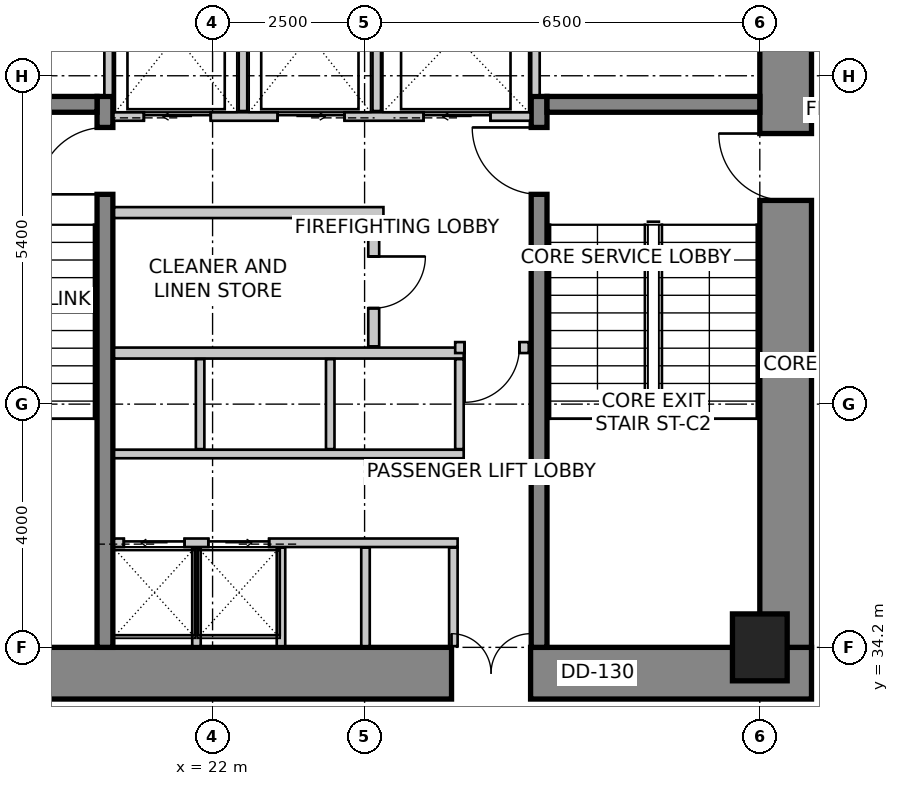
"""IFC4 building model, lengths in metres.
Left out: names, types, materials, properties, quantities, classifications, styles, units other than length and angle.
Written with IfcOpenShell. Run it as: python <this file> out.ifc"""

import sys

from ifc_helpers import new_model, si_unit, direction, frame, frame_2d, origin, origin_2d, place, context, subcontext, project, spatial, rectangle, extrude, source, transform, mapped, element, fill, save


model = new_model("IFC4")
c1 = context("Model", 3, precision=1e-05, world=origin(), true_north=direction((0.0, 1.0)))
c2 = subcontext(c1, "Body", "Model", "MODEL_VIEW")
j1 = project(units=[si_unit("LENGTHUNIT", "METRE"), si_unit("PLANEANGLEUNIT", "RADIAN")], contexts=[c1])
p1 = place(None, origin())
s1 = spatial("IfcSite", under=j1, at=p1, CompositionType="ELEMENT")
p2 = place(p1, origin())
s2 = spatial("IfcBuilding", under=s1, at=p2, CompositionType="ELEMENT")
p3 = place(p2, frame((0.0, 0.0, 67.0)))
s3 = spatial("IfcBuildingStorey", under=s2, at=p3, CompositionType="ELEMENT", Elevation=67.0)
p4 = place(p3, frame((15.75, 33.775, 0.0), z_axis=(0.0, 0.0, 1.0), x_axis=(1.0, 0.0, 0.0)))
e1 = element("IfcWall", 1, at=p4, inside=s3, PredefinedType="SHEAR", context=c2, shape_type="SweptSolid", body=[
    extrude(rectangle(XDim=16.1, YDim=0.85, at=frame_2d((8.05, 0.0))), origin(), (0.0, 0.0, 1.0), 4.0),
])
m1 = source(origin(), c2, "Body", "SweptSolid", [
    extrude(rectangle(XDim=1.3, YDim=2.15, at=frame_2d((0.65, 1.075))), frame((0.0, 0.435, 0.0), z_axis=(0.0, -1.0, 0.0), x_axis=(1.0, 0.0, 0.0)), (0.0, 0.0, 1.0), 0.87),
])
p5 = place(p4, frame((10.18, 0.0, 0.0)))
e2 = element("IfcOpeningElement", 2, at=p5, cuts=e1, PredefinedType="OPENING", context=c2, shape_type="MappedRepresentation", body=[
    mapped(m1, transform((0.0, 0.0, 0.0), scale=1.0)),
])
p6 = place(p3, frame((31.425, 34.2, 0.0), z_axis=(0.0, 0.0, 1.0), x_axis=(0.0, 1.0, 0.0)))
e3 = element("IfcWall", 3, at=p6, inside=s3, PredefinedType="SHEAR", context=c2, shape_type="SweptSolid", body=[
    extrude(rectangle(XDim=11.4, YDim=0.85, at=frame_2d((5.7, 0.0))), origin(), (0.0, 0.0, 1.0), 4.0),
])
m2 = source(origin(), c2, "Body", "SweptSolid", [
    extrude(rectangle(XDim=1.1, YDim=2.15, at=frame_2d((0.55, 1.075))), frame((0.0, 0.435, 0.0), z_axis=(0.0, -1.0, 0.0), x_axis=(1.0, 0.0, 0.0)), (0.0, 0.0, 1.0), 0.87),
])
p7 = place(p6, frame((7.35, 0.0, 0.0)))
e4 = element("IfcOpeningElement", 4, at=p7, cuts=e3, PredefinedType="OPENING", context=c2, shape_type="MappedRepresentation", body=[
    mapped(m2, transform((0.0, 0.0, 0.0), scale=1.0)),
])
p8 = place(p3, frame((20.23, 34.2, 0.0), z_axis=(0.0, 0.0, 1.0), x_axis=(0.0, 1.0, 0.0)))
e5 = element("IfcWall", 5, at=p8, inside=s3, PredefinedType="SHEAR", context=c2, shape_type="SweptSolid", body=[
    extrude(rectangle(XDim=9.06, YDim=0.26, at=frame_2d((4.53, 0.0))), origin(), (0.0, 0.0, 1.0), 4.0),
])
m3 = source(origin(), c2, "Body", "SweptSolid", [
    extrude(rectangle(XDim=1.1, YDim=2.15, at=frame_2d((0.55, 1.075))), frame((0.0, 0.14, 0.0), z_axis=(0.0, -1.0, 0.0), x_axis=(1.0, 0.0, 0.0)), (0.0, 0.0, 1.0), 0.28),
])
p9 = place(p8, frame((7.45, 0.0, 0.0)))
e6 = element("IfcOpeningElement", 6, at=p9, cuts=e5, PredefinedType="OPENING", context=c2, shape_type="MappedRepresentation", body=[
    mapped(m3, transform((0.0, 0.0, 0.0), scale=1.0)),
])
p10 = place(p3, frame((27.37, 34.2, 0.0), z_axis=(0.0, 0.0, 1.0), x_axis=(0.0, 1.0, 0.0)))
e7 = element("IfcWall", 7, at=p10, inside=s3, PredefinedType="SHEAR", context=c2, shape_type="SweptSolid", body=[
    extrude(rectangle(XDim=9.06, YDim=0.26, at=frame_2d((4.53, 0.0))), origin(), (0.0, 0.0, 1.0), 4.0),
])
p11 = place(p10, frame((7.45, 0.0, 0.0)))
e8 = element("IfcOpeningElement", 8, at=p11, cuts=e7, PredefinedType="OPENING", context=c2, shape_type="MappedRepresentation", body=[
    mapped(m3, transform((0.0, 0.0, 0.0), scale=1.0)),
])
for number, where, z_axis, x_axis in (
    (9, (16.6, 43.13, 0.0), (0.0, 0.0, 1.0), (1.0, 0.0, 0.0)),
    (10, (27.5, 43.13, 0.0), (0.0, 0.0, 1.0), (1.0, 0.0, 0.0)),
):
    element("IfcWall", number, at=place(p3, frame(where, z_axis=z_axis, x_axis=x_axis)), inside=s3, PredefinedType="SHEAR", context=c2, shape_type="SweptSolid", body=[
        extrude(rectangle(XDim=3.5, YDim=0.26, at=frame_2d((1.75, 0.0))), origin(), (0.0, 0.0, 1.0), 4.0),
    ])
m4 = source(origin(), c2, "Body", "SweptSolid", [
    extrude(rectangle(XDim=0.9, YDim=1.1, at=origin_2d()), origin(), (0.0, 0.0, 1.0), 4.0),
])
p12 = place(p3, frame((31.0, 34.2, 0.0), z_axis=(0.0, 0.0, 1.0), x_axis=(1.0, 0.0, 0.0)))
e11 = element("IfcColumn", 11, at=p12, inside=s3, PredefinedType="COLUMN", context=c2, shape_type="MappedRepresentation", body=[
    mapped(m4, transform((0.0, 0.0, 0.0), scale=1.0)),
])
p13 = place(p3, frame((20.37, 42.93, 0.0), z_axis=(0.0, 0.0, 1.0), x_axis=(1.0, 0.0, 0.0)))
e12 = element("IfcWall", 12, at=p13, inside=s3, PredefinedType="SOLIDWALL", context=c2, shape_type="SweptSolid", body=[
    extrude(rectangle(XDim=6.86, YDim=0.14, at=frame_2d((3.43, 0.0))), origin(), (0.0, 0.0, 1.0), 3.75),
])
m5 = source(origin(), c2, "Body", "SweptSolid", [
    extrude(rectangle(XDim=1.1, YDim=2.15, at=frame_2d((0.55, 1.075))), frame((0.0, 0.08, 0.0), z_axis=(0.0, -1.0, 0.0), x_axis=(1.0, 0.0, 0.0)), (0.0, 0.0, 1.0), 0.16),
])
p14 = place(p13, frame((0.5, 0.0, 0.0)))
e13 = element("IfcOpeningElement", 13, at=p14, cuts=e12, PredefinedType="OPENING", context=c2, shape_type="MappedRepresentation", body=[
    mapped(m5, transform((0.0, 0.0, 0.0), scale=1.0)),
])
p15 = place(p13, frame((2.7, 0.0, 0.0)))
e14 = element("IfcOpeningElement", 14, at=p15, cuts=e12, PredefinedType="OPENING", context=c2, shape_type="MappedRepresentation", body=[
    mapped(m5, transform((0.0, 0.0, 0.0), scale=1.0)),
])
p16 = place(p13, frame((5.1, 0.0, 0.0)))
e15 = element("IfcOpeningElement", 15, at=p16, cuts=e12, PredefinedType="OPENING", context=c2, shape_type="MappedRepresentation", body=[
    mapped(m5, transform((0.0, 0.0, 0.0), scale=1.0)),
])
for number, where, z_axis, x_axis in (
    (16, (20.29, 43.28, 0.0), (0.0, 0.0, 1.0), (0.0, 1.0, 0.0)),
    (17, (27.31, 43.28, 0.0), (0.0, 0.0, 1.0), (0.0, 1.0, 0.0)),
):
    element("IfcWall", number, at=place(p3, frame(where, z_axis=z_axis, x_axis=x_axis)), inside=s3, PredefinedType="SOLIDWALL", context=c2, shape_type="SweptSolid", body=[
        extrude(rectangle(XDim=2.3, YDim=0.14, at=frame_2d((1.15, 0.0))), origin(), (0.0, 0.0, 1.0), 3.75),
    ])
for number, where, z_axis, x_axis in (
    (18, (22.5, 43.02, 0.0), (0.0, 0.0, 1.0), (0.0, 1.0, 0.0)),
    (19, (24.7, 43.02, 0.0), (0.0, 0.0, 1.0), (0.0, 1.0, 0.0)),
):
    element("IfcWall", number, at=place(p3, frame(where, z_axis=z_axis, x_axis=x_axis)), inside=s3, PredefinedType="SOLIDWALL", context=c2, shape_type="SweptSolid", body=[
        extrude(rectangle(XDim=2.56, YDim=0.14, at=frame_2d((1.28, 0.0))), origin(), (0.0, 0.0, 1.0), 3.75),
    ])
p17 = place(p3, frame((20.38, 35.92, 0.0), z_axis=(0.0, 0.0, 1.0), x_axis=(1.0, 0.0, 0.0)))
e20 = element("IfcWall", 20, at=p17, inside=s3, PredefinedType="SOLIDWALL", context=c2, shape_type="SweptSolid", body=[
    extrude(rectangle(XDim=5.65, YDim=0.14, at=frame_2d((2.825, 0.0))), origin(), (0.0, 0.0, 1.0), 3.75),
])
m6 = source(origin(), c2, "Body", "SweptSolid", [
    extrude(rectangle(XDim=1.0, YDim=2.15, at=frame_2d((0.5, 1.075))), frame((0.0, 0.08, 0.0), z_axis=(0.0, -1.0, 0.0), x_axis=(1.0, 0.0, 0.0)), (0.0, 0.0, 1.0), 0.16),
])
p18 = place(p17, frame((0.16, 0.0, 0.0)))
e21 = element("IfcOpeningElement", 21, at=p18, cuts=e20, PredefinedType="OPENING", context=c2, shape_type="MappedRepresentation", body=[
    mapped(m6, transform((0.0, 0.0, 0.0), scale=1.0)),
])
p19 = place(p17, frame((1.55, 0.0, 0.0)))
e22 = element("IfcOpeningElement", 22, at=p19, cuts=e20, PredefinedType="OPENING", context=c2, shape_type="MappedRepresentation", body=[
    mapped(m6, transform((0.0, 0.0, 0.0), scale=1.0)),
])
for number, where, z_axis, x_axis in (
    (23, (25.96, 34.22, 0.0), (0.0, 0.0, 1.0), (0.0, 1.0, 0.0)),
    (24, (21.735, 34.22, 0.0), (0.0, 0.0, 1.0), (0.0, 1.0, 0.0)),
    (25, (23.125, 34.22, 0.0), (0.0, 0.0, 1.0), (0.0, 1.0, 0.0)),
    (26, (24.515, 34.22, 0.0), (0.0, 0.0, 1.0), (0.0, 1.0, 0.0)),
):
    element("IfcWall", number, at=place(p3, frame(where, z_axis=z_axis, x_axis=x_axis)), inside=s3, PredefinedType="SOLIDWALL", context=c2, shape_type="SweptSolid", body=[
        extrude(rectangle(XDim=1.62, YDim=0.14, at=frame_2d((0.81, 0.0))), origin(), (0.0, 0.0, 1.0), 3.042),
    ])
p20 = place(p3, frame((20.38, 37.38, 0.0), z_axis=(0.0, 0.0, 1.0), x_axis=(1.0, 0.0, 0.0)))
e27 = element("IfcWall", 27, at=p20, inside=s3, PredefinedType="SOLIDWALL", context=c2, shape_type="SweptSolid", body=[
    extrude(rectangle(XDim=5.75, YDim=0.14, at=frame_2d((2.875, 0.0))), origin(), (0.0, 0.0, 1.0), 3.75),
])
p21 = place(p3, frame((20.38, 39.04, 0.0), z_axis=(0.0, 0.0, 1.0), x_axis=(1.0, 0.0, 0.0)))
e28 = element("IfcWall", 28, at=p21, inside=s3, PredefinedType="SOLIDWALL", context=c2, shape_type="SweptSolid", body=[
    extrude(rectangle(XDim=5.75, YDim=0.18, at=frame_2d((2.875, 0.0))), origin(), (0.0, 0.0, 1.0), 3.75),
])
for number, where, z_axis, x_axis in (
    (29, (26.06, 37.46, 0.0), (0.0, 0.0, 1.0), (0.0, 1.0, 0.0)),
    (30, (21.795, 37.46, 0.0), (0.0, 0.0, 1.0), (0.0, 1.0, 0.0)),
    (31, (23.935, 37.46, 0.0), (0.0, 0.0, 1.0), (0.0, 1.0, 0.0)),
):
    element("IfcWall", number, at=place(p3, frame(where, z_axis=z_axis, x_axis=x_axis)), inside=s3, PredefinedType="SOLIDWALL", context=c2, shape_type="SweptSolid", body=[
        extrude(rectangle(XDim=1.48, YDim=0.14, at=frame_2d((0.74, 0.0))), origin(), (0.0, 0.0, 1.0), 3.75),
    ])
p22 = place(p3, frame((24.81, 41.35, 0.0), z_axis=(0.0, 0.0, 1.0), x_axis=(-1.0, 0.0, 0.0)))
e32 = element("IfcWall", 32, at=p22, inside=s3, PredefinedType="PARTITIONING", context=c2, shape_type="SweptSolid", body=[
    extrude(rectangle(XDim=4.43, YDim=0.18, at=frame_2d((2.215, 0.0))), origin(), (0.0, 0.0, 1.0), 3.75),
])
p23 = place(p3, frame((24.65, 41.256, 0.0), z_axis=(0.0, 0.0, 1.0), x_axis=(0.0, -1.0, 0.0)))
e33 = element("IfcWall", 33, at=p23, inside=s3, PredefinedType="PARTITIONING", context=c2, shape_type="SweptSolid", body=[
    extrude(rectangle(XDim=2.106, YDim=0.18, at=frame_2d((1.053, 0.0))), origin(), (0.0, 0.0, 1.0), 3.75),
])
m7 = source(origin(), c2, "Body", "SweptSolid", [
    extrude(rectangle(XDim=0.85, YDim=2.15, at=frame_2d((0.425, 1.075))), frame((0.0, 0.1, 0.0), z_axis=(0.0, -1.0, 0.0), x_axis=(1.0, 0.0, 0.0)), (0.0, 0.0, 1.0), 0.2),
])
p24 = place(p23, frame((0.628, 0.0, 0.0)))
e34 = element("IfcOpeningElement", 34, at=p24, cuts=e33, PredefinedType="OPENING", context=c2, shape_type="MappedRepresentation", body=[
    mapped(m7, transform((0.0, 0.0, 0.0), scale=1.0)),
])
p25 = place(p3, frame((27.2, 39.13, 0.0), z_axis=(0.0, 0.0, 1.0), x_axis=(-1.0, 0.0, 0.0)))
e35 = element("IfcWall", 35, at=p25, inside=s3, PredefinedType="PARTITIONING", context=c2, shape_type="SweptSolid", body=[
    extrude(rectangle(XDim=1.21, YDim=0.18, at=frame_2d((0.605, 0.0))), origin(), (0.0, 0.0, 1.0), 3.75),
])
m8 = source(origin(), c2, "Body", "SweptSolid", [
    extrude(rectangle(XDim=0.9, YDim=2.15, at=frame_2d((0.45, 1.075))), frame((0.0, 0.1, 0.0), z_axis=(0.0, -1.0, 0.0), x_axis=(1.0, 0.0, 0.0)), (0.0, 0.0, 1.0), 0.2),
])
p26 = place(p25, frame((0.155, 0.0, 0.0)))
e36 = element("IfcOpeningElement", 36, at=p26, cuts=e35, PredefinedType="OPENING", context=c2, shape_type="MappedRepresentation", body=[
    mapped(m8, transform((0.0, 0.0, 0.0), scale=1.0)),
])
m9 = source(origin(), c2, "Body", "SweptSolid", [
    extrude(rectangle(XDim=1.1, YDim=2.15, at=frame_2d((0.55, 1.075))), frame((0.0, 0.025, 0.0), z_axis=(0.0, -1.0, 0.0), x_axis=(1.0, 0.0, 0.0)), (0.0, 0.0, 1.0), 0.05),
])
p27 = place(p14, origin())
e37 = element("IfcDoor", 37, at=p27, inside=s3, OperationType="SLIDING_TO_LEFT", PredefinedType="DOOR", context=c2, shape_type="MappedRepresentation", body=[
    mapped(m9, transform((0.0, 0.0, 0.0), scale=1.0)),
])
fill(e13, e37)
p28 = place(p15, origin())
e38 = element("IfcDoor", 38, at=p28, inside=s3, OperationType="SLIDING_TO_RIGHT", PredefinedType="DOOR", context=c2, shape_type="MappedRepresentation", body=[
    mapped(m9, transform((0.0, 0.0, 0.0), scale=1.0)),
])
fill(e14, e38)
m10 = source(origin(), c2, "Body", "SweptSolid", [
    extrude(rectangle(XDim=1.1, YDim=2.15, at=frame_2d((0.55, 1.075))), frame((0.0, 0.025, 0.0), z_axis=(0.0, -1.0, 0.0), x_axis=(1.0, 0.0, 0.0)), (0.0, 0.0, 1.0), 0.05),
])
p29 = place(p16, origin())
e39 = element("IfcDoor", 39, at=p29, inside=s3, OperationType="SLIDING_TO_LEFT", PredefinedType="DOOR", context=c2, shape_type="MappedRepresentation", body=[
    mapped(m10, transform((0.0, 0.0, 0.0), scale=1.0)),
])
fill(e15, e39)
m11 = source(origin(), c2, "Body", "SweptSolid", [
    extrude(rectangle(XDim=1.0, YDim=2.15, at=frame_2d((0.5, 1.075))), frame((0.0, 0.025, 0.0), z_axis=(0.0, -1.0, 0.0), x_axis=(1.0, 0.0, 0.0)), (0.0, 0.0, 1.0), 0.05),
])
p30 = place(p18, origin())
e40 = element("IfcDoor", 40, at=p30, inside=s3, OperationType="SLIDING_TO_LEFT", PredefinedType="DOOR", context=c2, shape_type="MappedRepresentation", body=[
    mapped(m11, transform((0.0, 0.0, 0.0), scale=1.0)),
])
fill(e21, e40)
p31 = place(p19, origin())
e41 = element("IfcDoor", 41, at=p31, inside=s3, OperationType="SLIDING_TO_RIGHT", PredefinedType="DOOR", context=c2, shape_type="MappedRepresentation", body=[
    mapped(m11, transform((0.0, 0.0, 0.0), scale=1.0)),
])
fill(e22, e41)
m12 = source(origin(), c2, "Body", "SweptSolid", [
    extrude(rectangle(XDim=1.1, YDim=2.15, at=frame_2d((0.55, 1.075))), frame((0.0, 0.025, 0.0), z_axis=(0.0, -1.0, 0.0), x_axis=(1.0, 0.0, 0.0)), (0.0, 0.0, 1.0), 0.05),
])
p32 = place(p9, origin())
e42 = element("IfcDoor", 42, at=p32, inside=s3, OperationType="SINGLE_SWING_LEFT", PredefinedType="DOOR", context=c2, shape_type="MappedRepresentation", body=[
    mapped(m12, transform((0.0, 0.0, 0.0), scale=1.0)),
])
fill(e6, e42)
p33 = place(p11, origin())
e43 = element("IfcDoor", 43, at=p33, inside=s3, OperationType="SINGLE_SWING_RIGHT", PredefinedType="DOOR", context=c2, shape_type="MappedRepresentation", body=[
    mapped(m12, transform((0.0, 0.0, 0.0), scale=1.0)),
])
fill(e8, e43)
p34 = place(p7, origin())
e44 = element("IfcDoor", 44, at=p34, inside=s3, OperationType="SINGLE_SWING_RIGHT", PredefinedType="DOOR", context=c2, shape_type="MappedRepresentation", body=[
    mapped(m12, transform((0.0, 0.0, 0.0), scale=1.0)),
])
fill(e4, e44)
m13 = source(origin(), c2, "Body", "SweptSolid", [
    extrude(rectangle(XDim=1.3, YDim=2.15, at=frame_2d((0.65, 1.075))), frame((0.0, 0.025, 0.0), z_axis=(0.0, -1.0, 0.0), x_axis=(1.0, 0.0, 0.0)), (0.0, 0.0, 1.0), 0.05),
])
p35 = place(p5, origin())
e45 = element("IfcDoor", 45, at=p35, inside=s3, OperationType="DOUBLE_DOOR_SINGLE_SWING", PredefinedType="DOOR", context=c2, shape_type="MappedRepresentation", body=[
    mapped(m13, transform((0.0, 0.0, 0.0), scale=1.0)),
])
fill(e2, e45)
m14 = source(origin(), c2, "Body", "SweptSolid", [
    extrude(rectangle(XDim=0.85, YDim=2.15, at=frame_2d((0.425, 1.075))), frame((0.0, 0.025, 0.0), z_axis=(0.0, -1.0, 0.0), x_axis=(1.0, 0.0, 0.0)), (0.0, 0.0, 1.0), 0.05),
])
p36 = place(p24, origin())
e46 = element("IfcDoor", 46, at=p36, inside=s3, OperationType="SINGLE_SWING_LEFT", PredefinedType="DOOR", context=c2, shape_type="MappedRepresentation", body=[
    mapped(m14, transform((0.0, 0.0, 0.0), scale=1.0)),
])
fill(e34, e46)
m15 = source(origin(), c2, "Body", "SweptSolid", [
    extrude(rectangle(XDim=0.9, YDim=2.15, at=frame_2d((0.45, 1.075))), frame((0.0, 0.025, 0.0), z_axis=(0.0, -1.0, 0.0), x_axis=(1.0, 0.0, 0.0)), (0.0, 0.0, 1.0), 0.05),
])
p37 = place(p26, origin())
e47 = element("IfcDoor", 47, at=p37, inside=s3, OperationType="SINGLE_SWING_RIGHT", PredefinedType="DOOR", context=c2, shape_type="MappedRepresentation", body=[
    mapped(m15, transform((0.0, 0.0, 0.0), scale=1.0)),
])
fill(e36, e47)
save(model, sys.argv[1])
